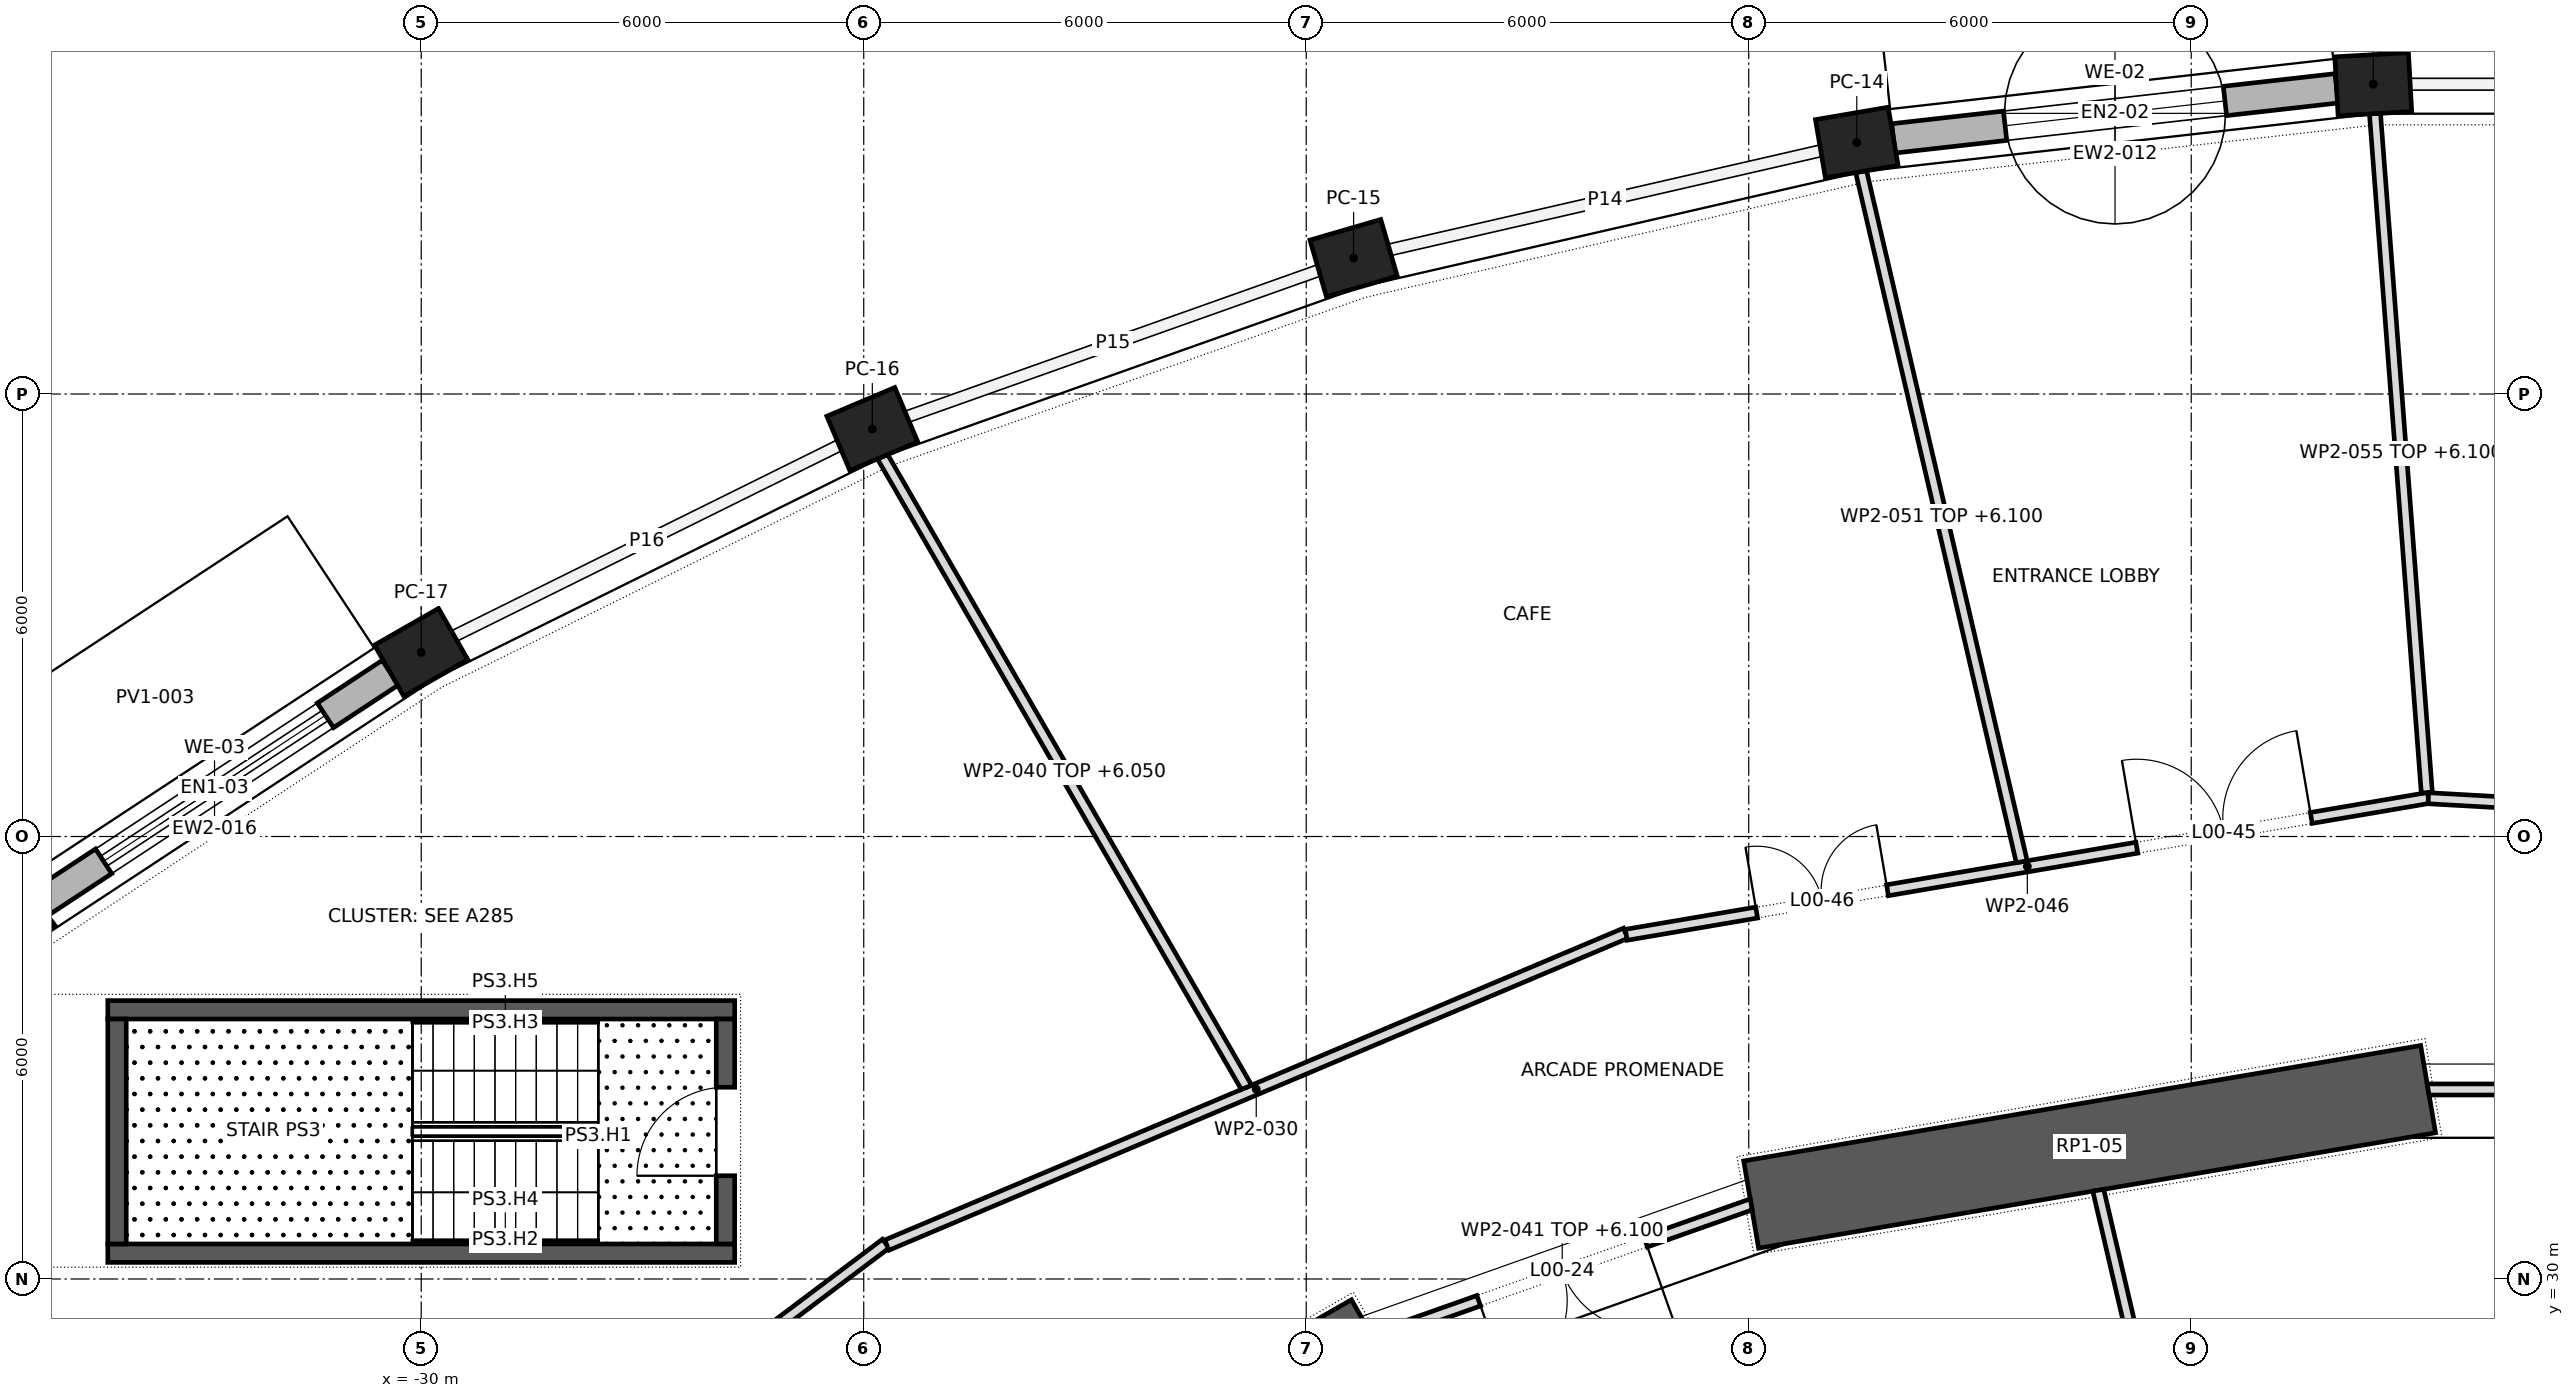
"""IFC4 building model, lengths in metres.
Left out: names, types, materials, properties, quantities, classifications, styles, units other than length and angle.
Written with IfcOpenShell. Run it as: python <this file> out.ifc"""

import sys

from ifc_helpers import new_model, si_unit, direction, frame, frame_2d, origin, origin_2d, place, context, subcontext, project, spatial, polyline, rectangle, outline, extrude, element, fill, save


model = new_model("IFC4")
c1 = context("Model", 3, precision=1e-05, world=origin(), true_north=direction((0.0, 1.0)))
c2 = subcontext(c1, "Body", "Model", "MODEL_VIEW")
j1 = project(units=[si_unit("LENGTHUNIT", "METRE"), si_unit("PLANEANGLEUNIT", "RADIAN")], contexts=[c1])
p1 = place(None, origin())
s1 = spatial("IfcSite", under=j1, at=p1, CompositionType="ELEMENT")
p2 = place(p1, origin())
s2 = spatial("IfcBuilding", under=s1, at=p2, CompositionType="ELEMENT")
p3 = place(p2, origin())
s3 = spatial("IfcBuildingStorey", under=s2, at=p3, CompositionType="ELEMENT", Elevation=0.0)
for number, where, z_axis, x_axis in (
    (1, (-3.532, 46.201, 0.0), (0.0, 0.0, 1.0), (-0.998, -0.056, 0.0)),
    (2, (-10.535, 45.41, 0.0), (0.0, 0.0, 1.0), (-0.986, -0.168, 0.0)),
    (3, (-17.358, 43.843, 0.0), (0.0, 0.0, 1.0), (-0.96, -0.279, 0.0)),
    (4, (-23.884, 41.525, 0.0), (0.0, 0.0, 1.0), (-0.921, -0.389, 0.0)),
    (5, (-30.001, 38.497, 0.0), (0.0, 0.0, 1.0), (-0.868, -0.497, 0.0)),
    (6, (-35.605, 34.81, 0.0), (0.0, 0.0, 1.0), (-0.799, -0.601, 0.0)),
):
    element("IfcColumn", number, at=place(p3, frame(where, z_axis=z_axis, x_axis=x_axis)), inside=s3, PredefinedType="COLUMN", context=c2, shape_type="SweptSolid", body=[
        extrude(rectangle(XDim=1.0, YDim=0.8, at=origin_2d()), origin(), (0.0, 0.0, 1.0), 7.0),
    ])
p4 = place(p3, frame((-2.788, 32.574, 0.0), z_axis=(0.0, 0.0, 1.0), x_axis=(-0.985776286846, -0.168062822456, 0.0)))
e7 = element("IfcWall", 7, at=p4, inside=s3, PredefinedType="SHEAR", context=c2, shape_type="SweptSolid", body=[
    extrude(rectangle(XDim=9.312, YDim=1.2, at=frame_2d((4.656, 0.0))), origin(), (0.0, 0.0, 1.0), 7.0),
])
p5 = place(p3, frame((-17.089, 29.198, 0.0), z_axis=(0.0, 0.0, 1.0), x_axis=(-0.867760656864, -0.496982336103, 0.0)))
e8 = element("IfcWall", 8, at=p5, inside=s3, PredefinedType="SHEAR", context=c2, shape_type="SweptSolid", body=[
    extrude(rectangle(XDim=9.038, YDim=1.2, at=frame_2d((4.519, 0.0))), origin(), (0.0, 0.0, 1.0), 7.0),
])
p6 = place(p3, frame((-4.029, 46.145, 0.0), z_axis=(0.0, 0.0, 1.0), x_axis=(-0.993691731831, -0.112146074793, 0.0)))
e9 = element("IfcWall", 9, at=p6, inside=s3, PredefinedType="STANDARD", context=c2, shape_type="SweptSolid", body=[
    extrude(rectangle(XDim=6.048, YDim=0.4, at=frame_2d((3.024, 0.0))), origin(), (0.0, 0.0, 1.0), 6.2),
])
p7 = place(p6, frame((1.524, 0.0, 0.0)))
e10 = element("IfcOpeningElement", 10, at=p7, cuts=e9, PredefinedType="OPENING", context=c2, shape_type="SweptSolid", body=[
    extrude(rectangle(XDim=3.0, YDim=3.0, at=frame_2d((1.5, 1.5))), frame((0.0, 0.212, 0.0), z_axis=(0.0, -1.0, 0.0), x_axis=(1.0, 0.0, 0.0)), (0.0, 0.0, 1.0), 0.424),
])
p8 = place(p6, frame((1.524, 0.0, 3.45)))
e11 = element("IfcOpeningElement", 11, at=p8, cuts=e9, PredefinedType="OPENING", context=c2, shape_type="SweptSolid", body=[
    extrude(rectangle(XDim=3.0, YDim=2.25, at=frame_2d((1.5, 1.125))), frame((0.0, 0.212, 0.0), z_axis=(0.0, -1.0, 0.0), x_axis=(1.0, 0.0, 0.0)), (0.0, 0.0, 1.0), 0.424),
])
p9 = place(p3, frame((-30.418, 38.222, 0.0), z_axis=(0.0, 0.0, 1.0), x_axis=(-0.835417082244, -0.549616501476, 0.0)))
e12 = element("IfcWall", 12, at=p9, inside=s3, PredefinedType="STANDARD", context=c2, shape_type="SweptSolid", body=[
    extrude(rectangle(XDim=5.708, YDim=0.4, at=frame_2d((2.854, 0.0))), origin(), (0.0, 0.0, 1.0), 6.2),
])
p10 = place(p9, frame((1.054, 0.0, 0.0)))
e13 = element("IfcOpeningElement", 13, at=p10, cuts=e12, PredefinedType="OPENING", context=c2, shape_type="SweptSolid", body=[
    extrude(rectangle(XDim=3.6, YDim=3.0, at=frame_2d((1.8, 1.5))), frame((0.0, 0.212, 0.0), z_axis=(0.0, -1.0, 0.0), x_axis=(1.0, 0.0, 0.0)), (0.0, 0.0, 1.0), 0.424),
])
p11 = place(p9, frame((1.054, 0.0, 3.45)))
e14 = element("IfcOpeningElement", 14, at=p11, cuts=e12, PredefinedType="OPENING", context=c2, shape_type="SweptSolid", body=[
    extrude(rectangle(XDim=3.6, YDim=2.25, at=frame_2d((1.8, 1.125))), frame((0.0, 0.212, 0.0), z_axis=(0.0, -1.0, 0.0), x_axis=(1.0, 0.0, 0.0)), (0.0, 0.0, 1.0), 0.424),
])
for number, where, z_axis, x_axis in (
    (15, (-34.25, 33.65, 0.0), (0.0, 0.0, 1.0), (1.0, 0.0, 0.0)),
    (16, (-34.25, 30.35, 0.0), (0.0, 0.0, 1.0), (1.0, 0.0, 0.0)),
):
    element("IfcWall", number, at=place(p3, frame(where, z_axis=z_axis, x_axis=x_axis)), inside=s3, PredefinedType="SHEAR", context=c2, shape_type="SweptSolid", body=[
        extrude(rectangle(XDim=8.5, YDim=0.25, at=frame_2d((4.25, 0.0))), origin(), (0.0, 0.0, 1.0), 6.65),
    ])
p12 = place(p3, frame((-34.125, 30.475, 0.0), z_axis=(0.0, 0.0, 1.0), x_axis=(0.0, 1.0, 0.0)))
e17 = element("IfcWall", 17, at=p12, inside=s3, PredefinedType="SHEAR", context=c2, shape_type="SweptSolid", body=[
    extrude(rectangle(XDim=3.05, YDim=0.25, at=frame_2d((1.525, 0.0))), origin(), (0.0, 0.0, 1.0), 6.65),
])
p13 = place(p3, frame((-25.875, 30.475, 0.0), z_axis=(0.0, 0.0, 1.0), x_axis=(0.0, 1.0, 0.0)))
e18 = element("IfcWall", 18, at=p13, inside=s3, PredefinedType="SHEAR", context=c2, shape_type="SweptSolid", body=[
    extrude(rectangle(XDim=3.05, YDim=0.25, at=frame_2d((1.525, 0.0))), origin(), (0.0, 0.0, 1.0), 6.65),
])
p14 = place(p13, frame((0.925, 0.0, 0.0)))
e19 = element("IfcOpeningElement", 19, at=p14, cuts=e18, PredefinedType="OPENING", context=c2, shape_type="SweptSolid", body=[
    extrude(rectangle(XDim=1.2, YDim=2.1, at=frame_2d((0.6, 1.05))), frame((0.0, 0.137, 0.0), z_axis=(0.0, -1.0, 0.0), x_axis=(1.0, 0.0, 0.0)), (0.0, 0.0, 1.0), 0.274),
])
p15 = place(p3, frame((-40.338, 30.225, 0.0), z_axis=(0.0, 0.0, 1.0), x_axis=(0.798789212221, -0.601610999267, 0.0)))
e20 = element("IfcWall", 20, at=p15, inside=s3, PredefinedType="PARTITIONING", context=c2, shape_type="SweptSolid", body=[
    extrude(outline(polyline([(-0.011, -0.075), (10.273, -0.075), (10.273, 0.075), (0.011, 0.075), (-0.011, -0.075)])), origin(), (0.0, 0.0, 1.0), 6.05),
])
p16 = place(p3, frame((-32.132, 24.139, 0.0), z_axis=(0.0, 0.0, 1.0), x_axis=(0.799199441693, 0.601065930158, 0.0)))
e21 = element("IfcWall", 21, at=p16, inside=s3, PredefinedType="PARTITIONING", context=c2, shape_type="SweptSolid", body=[
    extrude(rectangle(XDim=10.549, YDim=0.15, at=frame_2d((5.274, 0.0))), origin(), (0.0, 0.0, 1.0), 6.65),
])
p17 = place(p16, frame((4.001, 0.0, 0.0)))
e22 = element("IfcOpeningElement", 22, at=p17, cuts=e21, PredefinedType="OPENING", context=c2, shape_type="SweptSolid", body=[
    extrude(rectangle(XDim=2.4, YDim=2.1, at=frame_2d((1.2, 1.05))), frame((0.0, 0.087, 0.0), z_axis=(0.0, -1.0, 0.0), x_axis=(1.0, 0.0, 0.0)), (0.0, 0.0, 1.0), 0.174),
])
p18 = place(p3, frame((-23.687, 30.459, 0.0), z_axis=(0.0, 0.0, 1.0), x_axis=(0.921275306177, 0.388911056964, 0.0)))
e23 = element("IfcWall", 23, at=p18, inside=s3, PredefinedType="PARTITIONING", context=c2, shape_type="SweptSolid", body=[
    extrude(rectangle(XDim=10.873, YDim=0.15, at=frame_2d((5.437, 0.0))), origin(), (0.0, 0.0, 1.0), 6.65),
])
p19 = place(p3, frame((-18.81, 32.599, 0.0), z_axis=(0.0, 0.0, 1.0), x_axis=(-0.499854452602, 0.866109419308, 0.0)))
e24 = element("IfcWall", 24, at=p19, inside=s3, PredefinedType="PARTITIONING", context=c2, shape_type="SweptSolid", body=[
    extrude(outline(polyline([(-0.009, -0.075), (9.864, -0.075), (9.883, 0.075), (0.009, 0.075), (-0.009, -0.075)])), origin(), (0.0, 0.0, 1.0), 6.05),
])
p20 = place(p3, frame((-17.091, 29.2, 0.0), z_axis=(0.0, 0.0, 1.0), x_axis=(0.942814385805, 0.333318217204, 0.0)))
e25 = element("IfcWall", 25, at=p20, inside=s3, PredefinedType="PARTITIONING", context=c2, shape_type="SweptSolid", body=[
    extrude(outline(polyline([(0.014, -0.075), (5.422, -0.075), (5.448, 0.075), (-0.014, 0.075), (0.014, -0.075)])), origin(), (0.0, 0.0, 1.0), 6.1),
])
p21 = place(p20, frame((1.516, 0.0, 0.0)))
e26 = element("IfcOpeningElement", 26, at=p21, cuts=e25, PredefinedType="OPENING", context=c2, shape_type="SweptSolid", body=[
    extrude(rectangle(XDim=2.4, YDim=2.1, at=frame_2d((1.2, 1.05))), frame((0.0, 0.087, 0.0), z_axis=(0.0, -1.0, 0.0), x_axis=(1.0, 0.0, 0.0)), (0.0, 0.0, 1.0), 0.174),
])
p22 = place(p3, frame((-13.661, 34.667, 0.0), z_axis=(0.0, 0.0, 1.0), x_axis=(0.98575575727, 0.168183194788, 0.0)))
e27 = element("IfcWall", 27, at=p22, inside=s3, PredefinedType="PARTITIONING", context=c2, shape_type="SweptSolid", body=[
    extrude(rectangle(XDim=11.034, YDim=0.15, at=frame_2d((5.517, 0.0))), origin(), (0.0, 0.0, 1.0), 6.65),
])
p23 = place(p22, frame((7.023, 0.0, 0.0)))
e28 = element("IfcOpeningElement", 28, at=p23, cuts=e27, PredefinedType="OPENING", context=c2, shape_type="SweptSolid", body=[
    extrude(rectangle(XDim=2.4, YDim=2.1, at=frame_2d((1.2, 1.05))), frame((0.0, 0.087, 0.0), z_axis=(0.0, -1.0, 0.0), x_axis=(1.0, 0.0, 0.0)), (0.0, 0.0, 1.0), 0.174),
])
p24 = place(p22, frame((1.794, 0.0, 0.0)))
e29 = element("IfcOpeningElement", 29, at=p24, cuts=e27, PredefinedType="OPENING", context=c2, shape_type="SweptSolid", body=[
    extrude(rectangle(XDim=1.8, YDim=2.1, at=frame_2d((0.9, 1.05))), frame((0.0, 0.087, 0.0), z_axis=(0.0, -1.0, 0.0), x_axis=(1.0, 0.0, 0.0)), (0.0, 0.0, 1.0), 0.174),
])
p25 = place(p3, frame((-8.298, 35.657, 0.0), z_axis=(0.0, 0.0, 1.0), x_axis=(-0.226707460947, 0.973962898241, 0.0)))
e30 = element("IfcWall", 30, at=p25, inside=s3, PredefinedType="PARTITIONING", context=c2, shape_type="SweptSolid", body=[
    extrude(outline(polyline([(-0.004, -0.075), (9.604, -0.075), (9.613, 0.075), (0.004, 0.075), (-0.004, -0.075)])), origin(), (0.0, 0.0, 1.0), 6.1),
])
p26 = place(p3, frame((-7.261, 31.204, 0.0), z_axis=(0.0, 0.0, 1.0), x_axis=(0.227418301439, -0.973797163772, 0.0)))
e31 = element("IfcWall", 31, at=p26, inside=s3, PredefinedType="PARTITIONING", context=c2, shape_type="SweptSolid", body=[
    extrude(outline(polyline([(-0.005, -0.075), (7.322, -0.075), (7.322, 0.075), (0.005, 0.075), (-0.005, -0.075)])), origin(), (0.0, 0.0, 1.0), 6.65),
])
p27 = place(p3, frame((-2.806, 36.595, 0.0), z_axis=(0.0, 0.0, 1.0), x_axis=(-0.076140518104, 0.997097097329, 0.0)))
e32 = element("IfcWall", 32, at=p27, inside=s3, PredefinedType="PARTITIONING", context=c2, shape_type="SweptSolid", body=[
    extrude(outline(polyline([(0.0, -0.075), (9.233, -0.075), (9.236, 0.075), (0.0, 0.075), (0.0, -0.075)])), origin(), (0.0, 0.0, 1.0), 6.1),
])
p28 = place(p3, frame((-2.785, 36.519, 0.0), z_axis=(0.0, 0.0, 1.0), x_axis=(0.99840694737, -0.0564231109, 0.0)))
e33 = element("IfcWall", 33, at=p28, inside=s3, PredefinedType="PARTITIONING", context=c2, shape_type="SweptSolid", body=[
    extrude(rectangle(XDim=11.25, YDim=0.15, at=frame_2d((5.625, 0.0))), origin(), (0.0, 0.0, 1.0), 6.65),
])
p29 = place(p28, frame((7.448, 0.0, 0.0)))
e34 = element("IfcOpeningElement", 34, at=p29, cuts=e33, PredefinedType="OPENING", context=c2, shape_type="SweptSolid", body=[
    extrude(rectangle(XDim=1.8, YDim=2.1, at=frame_2d((0.9, 1.05))), frame((0.0, 0.087, 0.0), z_axis=(0.0, -1.0, 0.0), x_axis=(1.0, 0.0, 0.0)), (0.0, 0.0, 1.0), 0.174),
])
p30 = place(p28, frame((2.295, 0.0, 0.0)))
e35 = element("IfcOpeningElement", 35, at=p30, cuts=e33, PredefinedType="OPENING", context=c2, shape_type="SweptSolid", body=[
    extrude(rectangle(XDim=1.0, YDim=2.1, at=frame_2d((0.5, 1.05))), frame((0.0, 0.087, 0.0), z_axis=(0.0, -1.0, 0.0), x_axis=(1.0, 0.0, 0.0)), (0.0, 0.0, 1.0), 0.174),
])
p31 = place(p3, frame((-2.788, 32.57, 0.0), z_axis=(0.0, 0.0, 1.0), x_axis=(1.0, 0.0, 0.0)))
e36 = element("IfcWall", 36, at=p31, inside=s3, PredefinedType="PARTITIONING", context=c2, shape_type="SweptSolid", body=[
    extrude(outline(polyline([(0.013, -0.075), (5.563, -0.075), (5.589, 0.075), (-0.013, 0.075), (0.013, -0.075)])), origin(), (0.0, 0.0, 1.0), 6.1),
])
p32 = place(p31, frame((1.588, 0.0, 0.0)))
e37 = element("IfcOpeningElement", 37, at=p32, cuts=e36, PredefinedType="OPENING", context=c2, shape_type="SweptSolid", body=[
    extrude(rectangle(XDim=2.4, YDim=2.1, at=frame_2d((1.2, 1.05))), frame((0.0, 0.087, 0.0), z_axis=(0.0, -1.0, 0.0), x_axis=(1.0, 0.0, 0.0)), (0.0, 0.0, 1.0), 0.174),
])
p33 = place(p7, frame((3.0, 0.0, 0.0), z_axis=(0.0, 0.0, 1.0), x_axis=(-1.0, 0.0, 0.0)))
e38 = element("IfcDoor", 38, at=p33, inside=s3, OperationType="REVOLVING", PredefinedType="DOOR", context=c2, shape_type="SweptSolid", body=[
    extrude(rectangle(XDim=3.0, YDim=3.0, at=frame_2d((1.5, 1.5))), frame((0.0, 0.025, 0.0), z_axis=(0.0, -1.0, 0.0), x_axis=(1.0, 0.0, 0.0)), (0.0, 0.0, 1.0), 0.05),
])
fill(e10, e38)
p34 = place(p8, origin())
e39 = element("IfcWindow", 39, at=p34, inside=s3, PartitioningType="DOUBLE_PANEL_VERTICAL", PredefinedType="WINDOW", context=c2, shape_type="SweptSolid", body=[
    extrude(rectangle(XDim=3.0, YDim=2.25, at=frame_2d((1.5, 1.125))), frame((0.0, 0.03, 0.0), z_axis=(0.0, -1.0, 0.0), x_axis=(1.0, 0.0, 0.0)), (0.0, 0.0, 1.0), 0.06),
])
fill(e11, e39)
p35 = place(p10, frame((3.6, 0.0, 0.0), z_axis=(0.0, 0.0, 1.0), x_axis=(-1.0, 0.0, 0.0)))
e40 = element("IfcDoor", 40, at=p35, inside=s3, OperationType="DOUBLE_DOOR_SLIDING", PredefinedType="DOOR", context=c2, shape_type="SweptSolid", body=[
    extrude(rectangle(XDim=3.6, YDim=3.0, at=frame_2d((1.8, 1.5))), frame((0.0, 0.025, 0.0), z_axis=(0.0, -1.0, 0.0), x_axis=(1.0, 0.0, 0.0)), (0.0, 0.0, 1.0), 0.05),
])
fill(e13, e40)
p36 = place(p11, origin())
e41 = element("IfcWindow", 41, at=p36, inside=s3, PartitioningType="TRIPLE_PANEL_VERTICAL", PredefinedType="WINDOW", context=c2, shape_type="SweptSolid", body=[
    extrude(rectangle(XDim=3.6, YDim=2.25, at=frame_2d((1.8, 1.125))), frame((0.0, 0.03, 0.0), z_axis=(0.0, -1.0, 0.0), x_axis=(1.0, 0.0, 0.0)), (0.0, 0.0, 1.0), 0.06),
])
fill(e14, e41)
p37 = place(p14, origin())
e42 = element("IfcDoor", 42, at=p37, inside=s3, OperationType="SINGLE_SWING_RIGHT", PredefinedType="DOOR", context=c2, shape_type="SweptSolid", body=[
    extrude(rectangle(XDim=1.2, YDim=2.1, at=frame_2d((0.6, 1.05))), frame((0.0, 0.025, 0.0), z_axis=(0.0, -1.0, 0.0), x_axis=(1.0, 0.0, 0.0)), (0.0, 0.0, 1.0), 0.05),
])
fill(e19, e42)
p38 = place(p21, frame((2.4, 0.0, 0.0), z_axis=(0.0, 0.0, 1.0), x_axis=(-1.0, 0.0, 0.0)))
e43 = element("IfcDoor", 43, at=p38, inside=s3, OperationType="DOUBLE_DOOR_SINGLE_SWING", PredefinedType="DOOR", context=c2, shape_type="SweptSolid", body=[
    extrude(rectangle(XDim=2.4, YDim=2.1, at=frame_2d((1.2, 1.05))), frame((0.0, 0.025, 0.0), z_axis=(0.0, -1.0, 0.0), x_axis=(1.0, 0.0, 0.0)), (0.0, 0.0, 1.0), 0.05),
])
fill(e26, e43)
p39 = place(p23, origin())
e44 = element("IfcDoor", 44, at=p39, inside=s3, OperationType="DOUBLE_DOOR_SINGLE_SWING", PredefinedType="DOOR", context=c2, shape_type="SweptSolid", body=[
    extrude(rectangle(XDim=2.4, YDim=2.1, at=frame_2d((1.2, 1.05))), frame((0.0, 0.025, 0.0), z_axis=(0.0, -1.0, 0.0), x_axis=(1.0, 0.0, 0.0)), (0.0, 0.0, 1.0), 0.05),
])
fill(e28, e44)
p40 = place(p24, origin())
e45 = element("IfcDoor", 45, at=p40, inside=s3, OperationType="DOUBLE_DOOR_SINGLE_SWING", PredefinedType="DOOR", context=c2, shape_type="SweptSolid", body=[
    extrude(rectangle(XDim=1.8, YDim=2.1, at=frame_2d((0.9, 1.05))), frame((0.0, 0.025, 0.0), z_axis=(0.0, -1.0, 0.0), x_axis=(1.0, 0.0, 0.0)), (0.0, 0.0, 1.0), 0.05),
])
fill(e29, e45)
save(model, sys.argv[1])
